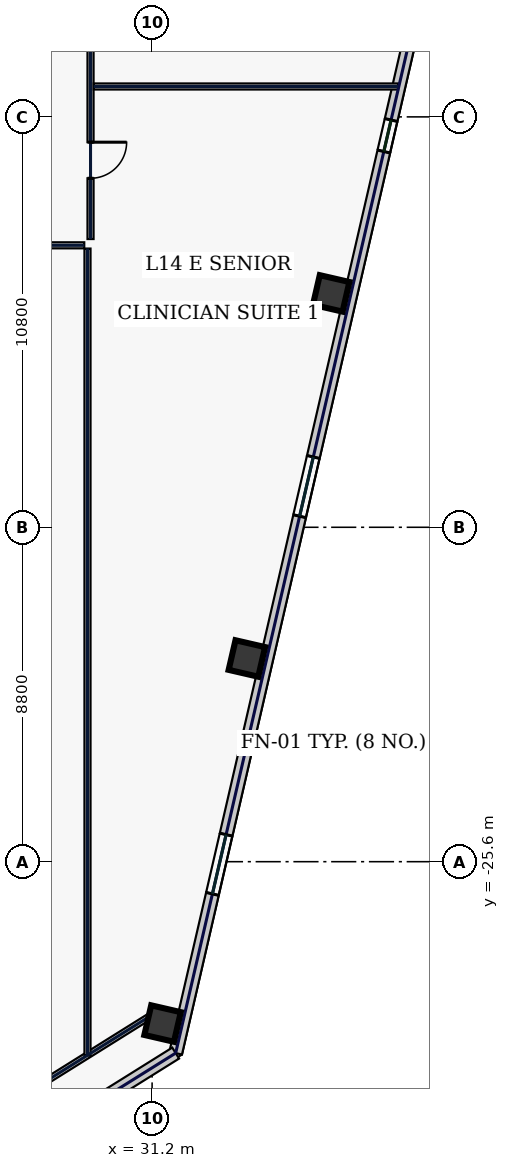
"""IFC4 building model, lengths in metres.
Left out: names, types, materials, properties, quantities, classifications, styles, units other than length and angle.
Written with IfcOpenShell. Run it as: python <this file> out.ifc"""

import sys

from ifc_helpers import new_model, si_unit, direction, frame, frame_2d, origin, origin_2d, place, context, subcontext, project, spatial, rectangle, hollow_rectangle, extrude, element, fill, save


model = new_model("IFC4")
c1 = context("Model", 3, precision=1e-05, world=origin(), true_north=direction((0.0, 1.0)))
c2 = subcontext(c1, "Body", "Model", "MODEL_VIEW")
j1 = project(units=[si_unit("LENGTHUNIT", "METRE"), si_unit("PLANEANGLEUNIT", "RADIAN")], contexts=[c1])
p1 = place(None, origin())
s1 = spatial("IfcSite", under=j1, at=p1, CompositionType="ELEMENT")
p2 = place(p1, origin())
s2 = spatial("IfcBuilding", under=s1, at=p2, CompositionType="ELEMENT")
p3 = place(p2, frame((0.0, 0.0, 67.4)))
s3 = spatial("IfcBuildingStorey", under=s2, at=p3, CompositionType="ELEMENT", Elevation=67.4)
for number, where, z_axis, x_axis in (
    (1, (31.476, -29.86, 0.0), (0.0, 0.0, 1.0), (0.974, -0.225, 0.0)),
    (2, (33.694, -20.252, 0.0), (0.0, 0.0, 1.0), (0.974, -0.225, 0.0)),
    (3, (35.912, -10.645, 0.0), (0.0, 0.0, 1.0), (0.974, -0.225, 0.0)),
):
    element("IfcColumn", number, at=place(p3, frame(where, z_axis=z_axis, x_axis=x_axis)), inside=s3, PredefinedType="COLUMN", context=c2, shape_type="SweptSolid", body=[
        extrude(hollow_rectangle(XDim=0.8, YDim=0.8, WallThickness=0.036, at=origin_2d()), origin(), (0.0, 0.0, 1.0), 3.74),
    ])
p4 = place(p3, frame((31.82, -30.637, 0.0), z_axis=(0.0, 0.0, 1.0), x_axis=(0.224949969076, 0.974370315338, 0.0)))
e4 = element("IfcWall", 4, at=p4, inside=s3, PredefinedType="STANDARD", context=c2, shape_type="SweptSolid", body=[
    extrude(rectangle(XDim=40.8, YDim=0.34, at=frame_2d((20.4, 0.0))), origin(), (0.0, 0.0, 1.0), 3.74),
])
p5 = place(p4, frame((4.3, 0.0, 0.58)))
e5 = element("IfcOpeningElement", 5, at=p5, cuts=e4, PredefinedType="OPENING", context=c2, shape_type="SweptSolid", body=[
    extrude(rectangle(XDim=1.6, YDim=2.3, at=frame_2d((0.8, 1.15))), frame((0.0, 0.18, 0.0), z_axis=(0.0, -1.0, 0.0), x_axis=(1.0, 0.0, 0.0)), (0.0, 0.0, 1.0), 0.36),
])
p6 = place(p4, frame((14.5, 0.0, 0.58)))
e6 = element("IfcOpeningElement", 6, at=p6, cuts=e4, PredefinedType="OPENING", context=c2, shape_type="SweptSolid", body=[
    extrude(rectangle(XDim=1.6, YDim=2.3, at=frame_2d((0.8, 1.15))), frame((0.0, 0.18, 0.0), z_axis=(0.0, -1.0, 0.0), x_axis=(1.0, 0.0, 0.0)), (0.0, 0.0, 1.0), 0.36),
])
p7 = place(p4, frame((24.35, 0.0, 0.75)))
e7 = element("IfcOpeningElement", 7, at=p7, cuts=e4, PredefinedType="OPENING", context=c2, shape_type="SweptSolid", body=[
    extrude(rectangle(XDim=0.85, YDim=1.85, at=frame_2d((0.425, 0.925))), frame((0.0, 0.18, 0.0), z_axis=(0.0, -1.0, 0.0), x_axis=(1.0, 0.0, 0.0)), (0.0, 0.0, 1.0), 0.36),
])
p8 = place(p4, frame((34.55, 0.0, 0.75)))
e8 = element("IfcOpeningElement", 8, at=p8, cuts=e4, PredefinedType="OPENING", context=c2, shape_type="SweptSolid", body=[
    extrude(rectangle(XDim=0.85, YDim=1.85, at=frame_2d((0.425, 0.925))), frame((0.0, 0.18, 0.0), z_axis=(0.0, -1.0, 0.0), x_axis=(1.0, 0.0, 0.0)), (0.0, 0.0, 1.0), 0.36),
])
p9 = place(p3, frame((25.788, -34.406, 0.0), z_axis=(0.0, 0.0, 1.0), x_axis=(0.848046504656, 0.529921811158, 0.0)))
e9 = element("IfcWall", 9, at=p9, inside=s3, PredefinedType="STANDARD", context=c2, shape_type="SweptSolid", body=[
    extrude(rectangle(XDim=7.113, YDim=0.34, at=frame_2d((3.557, 0.0))), origin(), (0.0, 0.0, 1.0), 3.74),
])
p10 = place(p3, frame((25.06, -33.468, 0.0), z_axis=(0.0, 0.0, 1.0), x_axis=(0.848043064089, 0.529927317139, 0.0)))
e10 = element("IfcWall", 10, at=p10, inside=s3, PredefinedType="PARTITIONING", context=c2, shape_type="SweptSolid", body=[
    extrude(rectangle(XDim=7.354, YDim=0.16, at=frame_2d((3.677, 0.0))), origin(), (0.0, 0.0, 1.0), 3.74),
])
p11 = place(p3, frame((29.58, 9.415, 0.0), z_axis=(0.0, 0.0, 1.0), x_axis=(0.0, -1.0, 0.0)))
e11 = element("IfcWall", 11, at=p11, inside=s3, PredefinedType="PARTITIONING", context=c2, shape_type="SweptSolid", body=[
    extrude(rectangle(XDim=18.63, YDim=0.16, at=frame_2d((9.315, 0.0))), origin(), (0.0, 0.0, 1.0), 3.74),
])
p12 = place(p11, frame((16.081, 0.0, 0.0)))
e12 = element("IfcOpeningElement", 12, at=p12, cuts=e11, PredefinedType="OPENING", context=c2, shape_type="SweptSolid", body=[
    extrude(rectangle(XDim=0.95, YDim=2.2, at=frame_2d((0.475, 1.1))), frame((0.0, 0.09, 0.0), z_axis=(0.0, -1.0, 0.0), x_axis=(1.0, 0.0, 0.0)), (0.0, 0.0, 1.0), 0.18),
])
p13 = place(p11, frame((11.0, 0.0, 0.0)))
e13 = element("IfcOpeningElement", 13, at=p13, cuts=e11, PredefinedType="OPENING", context=c2, shape_type="SweptSolid", body=[
    extrude(rectangle(XDim=0.95, YDim=2.2, at=frame_2d((0.475, 1.1))), frame((0.0, 0.09, 0.0), z_axis=(0.0, -1.0, 0.0), x_axis=(1.0, 0.0, 0.0)), (0.0, 0.0, 1.0), 0.18),
])
p14 = place(p11, frame((5.8, 0.0, 0.0)))
e14 = element("IfcOpeningElement", 14, at=p14, cuts=e11, PredefinedType="OPENING", context=c2, shape_type="SweptSolid", body=[
    extrude(rectangle(XDim=0.95, YDim=2.2, at=frame_2d((0.475, 1.1))), frame((0.0, 0.09, 0.0), z_axis=(0.0, -1.0, 0.0), x_axis=(1.0, 0.0, 0.0)), (0.0, 0.0, 1.0), 0.18),
])
p15 = place(p11, frame((1.869, 0.0, 0.0)))
e15 = element("IfcOpeningElement", 15, at=p15, cuts=e11, PredefinedType="OPENING", context=c2, shape_type="SweptSolid", body=[
    extrude(rectangle(XDim=0.95, YDim=2.2, at=frame_2d((0.475, 1.1))), frame((0.0, 0.09, 0.0), z_axis=(0.0, -1.0, 0.0), x_axis=(1.0, 0.0, 0.0)), (0.0, 0.0, 1.0), 0.18),
])
p16 = place(p3, frame((29.415, -9.38, 0.0), z_axis=(0.0, 0.0, 1.0), x_axis=(-1.0, 0.0, 0.0)))
e16 = element("IfcWall", 16, at=p16, inside=s3, PredefinedType="PARTITIONING", context=c2, shape_type="SweptSolid", body=[
    extrude(rectangle(XDim=58.83, YDim=0.16, at=frame_2d((29.415, 0.0))), origin(), (0.0, 0.0, 1.0), 3.74),
])
p17 = place(p16, frame((54.781, 0.0, 0.0)))
e17 = element("IfcOpeningElement", 17, at=p17, cuts=e16, PredefinedType="OPENING", context=c2, shape_type="SweptSolid", body=[
    extrude(rectangle(XDim=0.95, YDim=2.2, at=frame_2d((0.475, 1.1))), frame((0.0, 0.09, 0.0), z_axis=(0.0, -1.0, 0.0), x_axis=(1.0, 0.0, 0.0)), (0.0, 0.0, 1.0), 0.18),
])
p18 = place(p16, frame((47.625, 0.0, 0.0)))
e18 = element("IfcOpeningElement", 18, at=p18, cuts=e16, PredefinedType="OPENING", context=c2, shape_type="SweptSolid", body=[
    extrude(rectangle(XDim=1.3, YDim=2.2, at=frame_2d((0.65, 1.1))), frame((0.0, 0.09, 0.0), z_axis=(0.0, -1.0, 0.0), x_axis=(1.0, 0.0, 0.0)), (0.0, 0.0, 1.0), 0.18),
])
p19 = place(p16, frame((40.825, 0.0, 0.0)))
e19 = element("IfcOpeningElement", 19, at=p19, cuts=e16, PredefinedType="OPENING", context=c2, shape_type="SweptSolid", body=[
    extrude(rectangle(XDim=1.45, YDim=2.2, at=frame_2d((0.725, 1.1))), frame((0.0, 0.09, 0.0), z_axis=(0.0, -1.0, 0.0), x_axis=(1.0, 0.0, 0.0)), (0.0, 0.0, 1.0), 0.18),
])
p20 = place(p16, frame((33.625, 0.0, 0.0)))
e20 = element("IfcOpeningElement", 20, at=p20, cuts=e16, PredefinedType="OPENING", context=c2, shape_type="SweptSolid", body=[
    extrude(rectangle(XDim=1.3, YDim=2.2, at=frame_2d((0.65, 1.1))), frame((0.0, 0.09, 0.0), z_axis=(0.0, -1.0, 0.0), x_axis=(1.0, 0.0, 0.0)), (0.0, 0.0, 1.0), 0.18),
])
p21 = place(p16, frame((26.2, 0.0, 0.0)))
e21 = element("IfcOpeningElement", 21, at=p21, cuts=e16, PredefinedType="OPENING", context=c2, shape_type="SweptSolid", body=[
    extrude(rectangle(XDim=0.95, YDim=2.2, at=frame_2d((0.475, 1.1))), frame((0.0, 0.09, 0.0), z_axis=(0.0, -1.0, 0.0), x_axis=(1.0, 0.0, 0.0)), (0.0, 0.0, 1.0), 0.18),
])
p22 = place(p16, frame((18.85, 0.0, 0.0)))
e22 = element("IfcOpeningElement", 22, at=p22, cuts=e16, PredefinedType="OPENING", context=c2, shape_type="SweptSolid", body=[
    extrude(rectangle(XDim=0.95, YDim=2.2, at=frame_2d((0.475, 1.1))), frame((0.0, 0.09, 0.0), z_axis=(0.0, -1.0, 0.0), x_axis=(1.0, 0.0, 0.0)), (0.0, 0.0, 1.0), 0.18),
])
p23 = place(p16, frame((11.75, 0.0, 0.0)))
e23 = element("IfcOpeningElement", 23, at=p23, cuts=e16, PredefinedType="OPENING", context=c2, shape_type="SweptSolid", body=[
    extrude(rectangle(XDim=1.05, YDim=2.2, at=frame_2d((0.525, 1.1))), frame((0.0, 0.09, 0.0), z_axis=(0.0, -1.0, 0.0), x_axis=(1.0, 0.0, 0.0)), (0.0, 0.0, 1.0), 0.18),
])
p24 = place(p16, frame((5.975, 0.0, 0.0)))
e24 = element("IfcOpeningElement", 24, at=p24, cuts=e16, PredefinedType="OPENING", context=c2, shape_type="SweptSolid", body=[
    extrude(rectangle(XDim=0.95, YDim=2.2, at=frame_2d((0.475, 1.1))), frame((0.0, 0.09, 0.0), z_axis=(0.0, -1.0, 0.0), x_axis=(1.0, 0.0, 0.0)), (0.0, 0.0, 1.0), 0.18),
])
p25 = place(p16, frame((1.719, 0.0, 0.0)))
e25 = element("IfcOpeningElement", 25, at=p25, cuts=e16, PredefinedType="OPENING", context=c2, shape_type="SweptSolid", body=[
    extrude(rectangle(XDim=1.15, YDim=2.2, at=frame_2d((0.575, 1.1))), frame((0.0, 0.09, 0.0), z_axis=(0.0, -1.0, 0.0), x_axis=(1.0, 0.0, 0.0)), (0.0, 0.0, 1.0), 0.18),
])
p26 = place(p3, frame((29.5, -30.703, 0.0), z_axis=(0.0, 0.0, 1.0), x_axis=(0.0, 1.0, 0.0)))
e26 = element("IfcWall", 26, at=p26, inside=s3, PredefinedType="PARTITIONING", context=c2, shape_type="SweptSolid", body=[
    extrude(rectangle(XDim=21.238, YDim=0.16, at=frame_2d((10.619, 0.0))), origin(), (0.0, 0.0, 1.0), 3.74),
])
p27 = place(p3, frame((29.665, -5.2, 0.0), z_axis=(0.0, 0.0, 1.0), x_axis=(1.0, 0.0, 0.0)))
e27 = element("IfcWall", 27, at=p27, inside=s3, PredefinedType="PARTITIONING", context=c2, shape_type="SweptSolid", body=[
    extrude(rectangle(XDim=8.007, YDim=0.16, at=frame_2d((4.003, 0.0))), origin(), (0.0, 0.0, 1.0), 3.74),
])
p28 = place(p5, origin())
e28 = element("IfcWindow", 28, at=p28, inside=s3, PartitioningType="SINGLE_PANEL", PredefinedType="WINDOW", context=c2, shape_type="SweptSolid", body=[
    extrude(rectangle(XDim=1.6, YDim=2.3, at=frame_2d((0.8, 1.15))), frame((0.0, 0.03, 0.0), z_axis=(0.0, -1.0, 0.0), x_axis=(1.0, 0.0, 0.0)), (0.0, 0.0, 1.0), 0.06),
])
fill(e5, e28)
p29 = place(p6, origin())
e29 = element("IfcWindow", 29, at=p29, inside=s3, PartitioningType="SINGLE_PANEL", PredefinedType="WINDOW", context=c2, shape_type="SweptSolid", body=[
    extrude(rectangle(XDim=1.6, YDim=2.3, at=frame_2d((0.8, 1.15))), frame((0.0, 0.03, 0.0), z_axis=(0.0, -1.0, 0.0), x_axis=(1.0, 0.0, 0.0)), (0.0, 0.0, 1.0), 0.06),
])
fill(e6, e29)
p30 = place(p7, origin())
e30 = element("IfcWindow", 30, at=p30, inside=s3, PartitioningType="SINGLE_PANEL", PredefinedType="WINDOW", context=c2, shape_type="SweptSolid", body=[
    extrude(rectangle(XDim=0.85, YDim=1.85, at=frame_2d((0.425, 0.925))), frame((0.0, 0.03, 0.0), z_axis=(0.0, -1.0, 0.0), x_axis=(1.0, 0.0, 0.0)), (0.0, 0.0, 1.0), 0.06),
])
fill(e7, e30)
p31 = place(p12, origin())
e31 = element("IfcDoor", 31, at=p31, inside=s3, OperationType="SINGLE_SWING_LEFT", PredefinedType="DOOR", context=c2, shape_type="SweptSolid", body=[
    extrude(rectangle(XDim=0.95, YDim=2.2, at=frame_2d((0.475, 1.1))), frame((0.0, 0.025, 0.0), z_axis=(0.0, -1.0, 0.0), x_axis=(1.0, 0.0, 0.0)), (0.0, 0.0, 1.0), 0.05),
])
fill(e12, e31)
save(model, sys.argv[1])
